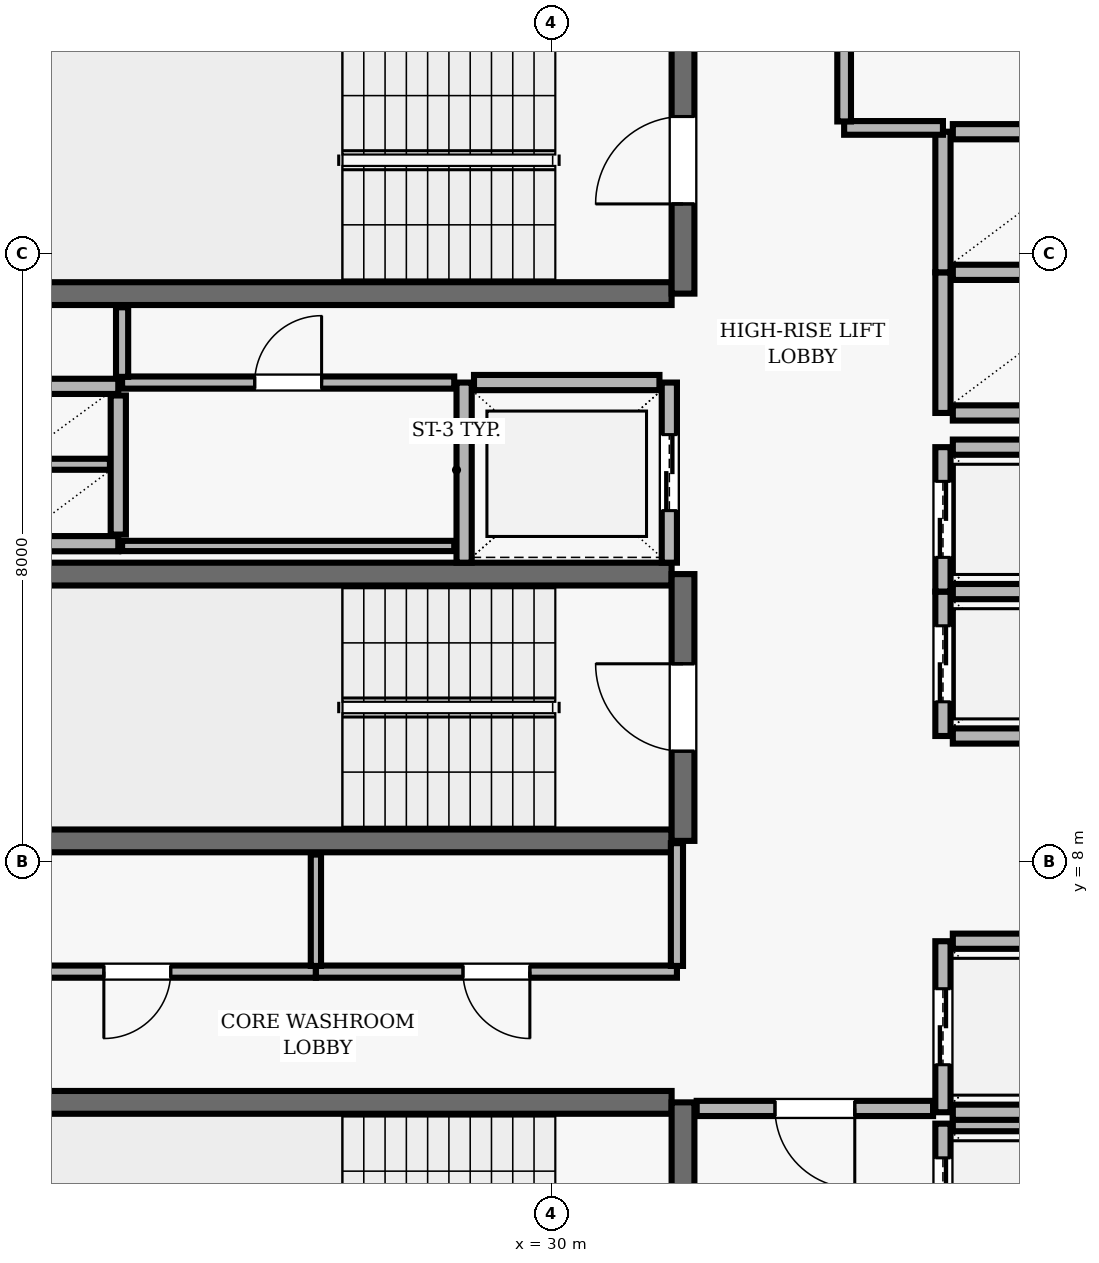
"""IFC4 building model, lengths in metres.
Left out: names, types, materials, properties, quantities, classifications, styles, units other than length and angle.
Written with IfcOpenShell. Run it as: python <this file> out.ifc"""

import sys

from ifc_helpers import new_model, si_unit, direction, frame, frame_2d, origin, place, context, subcontext, project, spatial, rectangle, extrude, element, fill, save


model = new_model("IFC4")
c1 = context("Model", 3, precision=1e-05, world=origin(), true_north=direction((0.0, 1.0)))
c2 = subcontext(c1, "Body", "Model", "MODEL_VIEW")
j1 = project(units=[si_unit("LENGTHUNIT", "METRE"), si_unit("PLANEANGLEUNIT", "RADIAN")], contexts=[c1])
p1 = place(None, origin())
s1 = spatial("IfcSite", under=j1, at=p1, CompositionType="ELEMENT")
p2 = place(p1, origin())
s2 = spatial("IfcBuilding", under=s1, at=p2, CompositionType="ELEMENT")
p3 = place(p2, frame((0.0, 0.0, 203.1)))
s3 = spatial("IfcBuildingStorey", under=s2, at=p3, CompositionType="ELEMENT", Elevation=203.1)
p4 = place(p3, frame((31.58, 4.83, 0.0), z_axis=(0.0, 0.0, 1.0), x_axis=(-1.0, 0.0, 0.0)))
e1 = element("IfcWall", 1, at=p4, inside=s3, PredefinedType="SHEAR", context=c2, shape_type="SweptSolid", body=[
    extrude(rectangle(XDim=8.36, YDim=0.3, at=frame_2d((4.18, 0.0))), origin(), (0.0, 0.0, 1.0), 3.69),
])
p5 = place(p3, frame((31.73, 0.96, 0.0), z_axis=(0.0, 0.0, 1.0), x_axis=(0.0, 1.0, 0.0)))
e2 = element("IfcWall", 2, at=p5, inside=s3, PredefinedType="SHEAR", context=c2, shape_type="SweptSolid", body=[
    extrude(rectangle(XDim=3.87, YDim=0.3, at=frame_2d((1.935, 0.0))), origin(), (0.0, 0.0, 1.0), 3.69),
])
p6 = place(p5, frame((1.54, 0.0, 0.0)))
e3 = element("IfcOpeningElement", 3, at=p6, cuts=e2, PredefinedType="OPENING", context=c2, shape_type="SweptSolid", body=[
    extrude(rectangle(XDim=1.15, YDim=2.15, at=frame_2d((0.575, 1.075))), frame((0.0, 0.16, 0.0), z_axis=(0.0, -1.0, 0.0), x_axis=(1.0, 0.0, 0.0)), (0.0, 0.0, 1.0), 0.32),
])
p7 = place(p3, frame((23.22, 15.47, 0.0), z_axis=(0.0, 0.0, 1.0), x_axis=(1.0, 0.0, 0.0)))
e4 = element("IfcWall", 4, at=p7, inside=s3, PredefinedType="SHEAR", context=c2, shape_type="SweptSolid", body=[
    extrude(rectangle(XDim=8.36, YDim=0.3, at=frame_2d((4.18, 0.0))), origin(), (0.0, 0.0, 1.0), 3.69),
])
p8 = place(p3, frame((31.73, 15.47, 0.0), z_axis=(0.0, 0.0, 1.0), x_axis=(0.0, 1.0, 0.0)))
e5 = element("IfcWall", 5, at=p8, inside=s3, PredefinedType="SHEAR", context=c2, shape_type="SweptSolid", body=[
    extrude(rectangle(XDim=3.51, YDim=0.3, at=frame_2d((1.755, 0.0))), origin(), (0.0, 0.0, 1.0), 3.69),
])
p9 = place(p8, frame((1.18, 0.0, 0.0)))
e6 = element("IfcOpeningElement", 6, at=p9, cuts=e5, PredefinedType="OPENING", context=c2, shape_type="SweptSolid", body=[
    extrude(rectangle(XDim=1.15, YDim=2.15, at=frame_2d((0.575, 1.075))), frame((0.0, 0.16, 0.0), z_axis=(0.0, -1.0, 0.0), x_axis=(1.0, 0.0, 0.0)), (0.0, 0.0, 1.0), 0.32),
])
for number, where, z_axis, x_axis in (
    (7, (31.58, 11.78, 0.0), (0.0, 0.0, 1.0), (-1.0, 0.0, 0.0)),
    (8, (23.22, 8.27, 0.0), (0.0, 0.0, 1.0), (1.0, 0.0, 0.0)),
):
    element("IfcWall", number, at=place(p3, frame(where, z_axis=z_axis, x_axis=x_axis)), inside=s3, PredefinedType="SHEAR", context=c2, shape_type="SweptSolid", body=[
        extrude(rectangle(XDim=8.36, YDim=0.3, at=frame_2d((4.18, 0.0))), origin(), (0.0, 0.0, 1.0), 3.69),
    ])
p10 = place(p3, frame((31.73, 8.27, 0.0), z_axis=(0.0, 0.0, 1.0), x_axis=(0.0, 1.0, 0.0)))
e9 = element("IfcWall", 9, at=p10, inside=s3, PredefinedType="SHEAR", context=c2, shape_type="SweptSolid", body=[
    extrude(rectangle(XDim=3.51, YDim=0.3, at=frame_2d((1.755, 0.0))), origin(), (0.0, 0.0, 1.0), 3.69),
])
p11 = place(p10, frame((1.18, 0.0, 0.0)))
e10 = element("IfcOpeningElement", 10, at=p11, cuts=e9, PredefinedType="OPENING", context=c2, shape_type="SweptSolid", body=[
    extrude(rectangle(XDim=1.15, YDim=2.15, at=frame_2d((0.575, 1.075))), frame((0.0, 0.16, 0.0), z_axis=(0.0, -1.0, 0.0), x_axis=(1.0, 0.0, 0.0)), (0.0, 0.0, 1.0), 0.32),
])
p12 = place(p3, frame((35.15, 4.55, 0.0), z_axis=(0.0, 0.0, 1.0), x_axis=(0.0, -1.0, 0.0)))
e11 = element("IfcWall", 11, at=p12, inside=s3, PredefinedType="SOLIDWALL", context=c2, shape_type="SweptSolid", body=[
    extrude(rectangle(XDim=2.1, YDim=0.2, at=frame_2d((1.05, 0.0))), origin(), (0.0, 0.0, 1.0), 3.69),
])
p13 = place(p12, frame((0.45, 0.0, 0.0)))
e12 = element("IfcOpeningElement", 12, at=p13, cuts=e11, PredefinedType="OPENING", context=c2, shape_type="SweptSolid", body=[
    extrude(rectangle(XDim=1.2, YDim=2.15, at=frame_2d((0.6, 1.075))), frame((0.0, 0.11, 0.0), z_axis=(0.0, -1.0, 0.0), x_axis=(1.0, 0.0, 0.0)), (0.0, 0.0, 1.0), 0.22),
])
p14 = place(p3, frame((37.42, 4.55, 0.0), z_axis=(0.0, 0.0, 1.0), x_axis=(-1.0, 0.0, 0.0)))
e13 = element("IfcWall", 13, at=p14, inside=s3, PredefinedType="SOLIDWALL", context=c2, shape_type="SweptSolid", body=[
    extrude(rectangle(XDim=2.14, YDim=0.2, at=frame_2d((1.07, 0.0))), origin(), (0.0, 0.0, 1.0), 3.69),
])
p15 = place(p3, frame((35.15, 6.95, 0.0), z_axis=(0.0, 0.0, 1.0), x_axis=(0.0, -1.0, 0.0)))
e14 = element("IfcWall", 14, at=p15, inside=s3, PredefinedType="SOLIDWALL", context=c2, shape_type="SweptSolid", body=[
    extrude(rectangle(XDim=2.25, YDim=0.2, at=frame_2d((1.125, 0.0))), origin(), (0.0, 0.0, 1.0), 3.69),
])
p16 = place(p15, frame((0.625, 0.0, 0.0)))
e15 = element("IfcOpeningElement", 15, at=p16, cuts=e14, PredefinedType="OPENING", context=c2, shape_type="SweptSolid", body=[
    extrude(rectangle(XDim=1.0, YDim=2.1, at=frame_2d((0.5, 1.05))), frame((0.0, 0.11, 0.0), z_axis=(0.0, -1.0, 0.0), x_axis=(1.0, 0.0, 0.0)), (0.0, 0.0, 1.0), 0.22),
])
for number, where, z_axis, x_axis in (
    (16, (35.28, 4.7, 0.0), (0.0, 0.0, 1.0), (1.0, 0.0, 0.0)),
    (17, (37.42, 6.95, 0.0), (0.0, 0.0, 1.0), (-1.0, 0.0, 0.0)),
):
    element("IfcWall", number, at=place(p3, frame(where, z_axis=z_axis, x_axis=x_axis)), inside=s3, PredefinedType="SOLIDWALL", context=c2, shape_type="SweptSolid", body=[
        extrude(rectangle(XDim=2.14, YDim=0.2, at=frame_2d((1.07, 0.0))), origin(), (0.0, 0.0, 1.0), 3.69),
    ])
p17 = place(p3, frame((35.15, 11.55, 0.0), z_axis=(0.0, 0.0, 1.0), x_axis=(0.0, -1.0, 0.0)))
e18 = element("IfcWall", 18, at=p17, inside=s3, PredefinedType="SOLIDWALL", context=c2, shape_type="SweptSolid", body=[
    extrude(rectangle(XDim=1.9, YDim=0.2, at=frame_2d((0.95, 0.0))), origin(), (0.0, 0.0, 1.0), 3.69),
])
p18 = place(p17, frame((0.45, 0.0, 0.0)))
e19 = element("IfcOpeningElement", 19, at=p18, cuts=e18, PredefinedType="OPENING", context=c2, shape_type="SweptSolid", body=[
    extrude(rectangle(XDim=1.0, YDim=2.1, at=frame_2d((0.5, 1.05))), frame((0.0, 0.11, 0.0), z_axis=(0.0, -1.0, 0.0), x_axis=(1.0, 0.0, 0.0)), (0.0, 0.0, 1.0), 0.22),
])
for number, where, z_axis, x_axis in (
    (20, (35.28, 9.65, 0.0), (0.0, 0.0, 1.0), (1.0, 0.0, 0.0)),
    (21, (37.42, 11.55, 0.0), (0.0, 0.0, 1.0), (-1.0, 0.0, 0.0)),
):
    element("IfcWall", number, at=place(p3, frame(where, z_axis=z_axis, x_axis=x_axis)), inside=s3, PredefinedType="SOLIDWALL", context=c2, shape_type="SweptSolid", body=[
        extrude(rectangle(XDim=2.14, YDim=0.2, at=frame_2d((1.07, 0.0))), origin(), (0.0, 0.0, 1.0), 3.69),
    ])
p19 = place(p3, frame((35.15, 13.45, 0.0), z_axis=(0.0, 0.0, 1.0), x_axis=(0.0, -1.0, 0.0)))
e22 = element("IfcWall", 22, at=p19, inside=s3, PredefinedType="SOLIDWALL", context=c2, shape_type="SweptSolid", body=[
    extrude(rectangle(XDim=1.9, YDim=0.2, at=frame_2d((0.95, 0.0))), origin(), (0.0, 0.0, 1.0), 3.69),
])
p20 = place(p19, frame((0.45, 0.0, 0.0)))
e23 = element("IfcOpeningElement", 23, at=p20, cuts=e22, PredefinedType="OPENING", context=c2, shape_type="SweptSolid", body=[
    extrude(rectangle(XDim=1.0, YDim=2.1, at=frame_2d((0.5, 1.05))), frame((0.0, 0.11, 0.0), z_axis=(0.0, -1.0, 0.0), x_axis=(1.0, 0.0, 0.0)), (0.0, 0.0, 1.0), 0.22),
])
p21 = place(p3, frame((37.42, 13.45, 0.0), z_axis=(0.0, 0.0, 1.0), x_axis=(-1.0, 0.0, 0.0)))
e24 = element("IfcWall", 24, at=p21, inside=s3, PredefinedType="SOLIDWALL", context=c2, shape_type="SweptSolid", body=[
    extrude(rectangle(XDim=2.14, YDim=0.2, at=frame_2d((1.07, 0.0))), origin(), (0.0, 0.0, 1.0), 3.69),
])
p22 = place(p3, frame((28.85, 14.3, 0.0), z_axis=(0.0, 0.0, 1.0), x_axis=(0.0, -1.0, 0.0)))
e25 = element("IfcWall", 25, at=p22, inside=s3, PredefinedType="SOLIDWALL", context=c2, shape_type="SweptSolid", body=[
    extrude(rectangle(XDim=2.37, YDim=0.2, at=frame_2d((1.185, 0.0))), origin(), (0.0, 0.0, 1.0), 3.69),
])
p23 = place(p3, frame((31.55, 11.93, 0.0), z_axis=(0.0, 0.0, 1.0), x_axis=(0.0, 1.0, 0.0)))
e26 = element("IfcWall", 26, at=p23, inside=s3, PredefinedType="SOLIDWALL", context=c2, shape_type="SweptSolid", body=[
    extrude(rectangle(XDim=2.37, YDim=0.2, at=frame_2d((1.185, 0.0))), origin(), (0.0, 0.0, 1.0), 3.69),
])
p24 = place(p23, frame((0.685, 0.0, 0.0)))
e27 = element("IfcOpeningElement", 27, at=p24, cuts=e26, PredefinedType="OPENING", context=c2, shape_type="SweptSolid", body=[
    extrude(rectangle(XDim=1.0, YDim=2.1, at=frame_2d((0.5, 1.05))), frame((0.0, 0.11, 0.0), z_axis=(0.0, -1.0, 0.0), x_axis=(1.0, 0.0, 0.0)), (0.0, 0.0, 1.0), 0.22),
])
p25 = place(p3, frame((31.42, 14.3, 0.0), z_axis=(0.0, 0.0, 1.0), x_axis=(-1.0, 0.0, 0.0)))
e28 = element("IfcWall", 28, at=p25, inside=s3, PredefinedType="SOLIDWALL", context=c2, shape_type="SweptSolid", body=[
    extrude(rectangle(XDim=2.44, YDim=0.2, at=frame_2d((1.22, 0.0))), origin(), (0.0, 0.0, 1.0), 3.69),
])
p26 = place(p3, frame((35.15, 15.75, 0.0), z_axis=(0.0, 0.0, 1.0), x_axis=(0.0, -1.0, 0.0)))
e29 = element("IfcWall", 29, at=p26, inside=s3, PredefinedType="SOLIDWALL", context=c2, shape_type="SweptSolid", body=[
    extrude(rectangle(XDim=1.85, YDim=0.2, at=frame_2d((0.925, 0.0))), origin(), (0.0, 0.0, 1.0), 3.69),
])
for number, where, z_axis, x_axis in (
    (30, (35.28, 13.9, 0.0), (0.0, 0.0, 1.0), (1.0, 0.0, 0.0)),
    (31, (37.42, 15.75, 0.0), (0.0, 0.0, 1.0), (-1.0, 0.0, 0.0)),
):
    element("IfcWall", number, at=place(p3, frame(where, z_axis=z_axis, x_axis=x_axis)), inside=s3, PredefinedType="SOLIDWALL", context=c2, shape_type="SweptSolid", body=[
        extrude(rectangle(XDim=2.14, YDim=0.2, at=frame_2d((1.07, 0.0))), origin(), (0.0, 0.0, 1.0), 3.69),
    ])
p27 = place(p3, frame((35.15, 17.6, 0.0), z_axis=(0.0, 0.0, 1.0), x_axis=(0.0, -1.0, 0.0)))
e32 = element("IfcWall", 32, at=p27, inside=s3, PredefinedType="SOLIDWALL", context=c2, shape_type="SweptSolid", body=[
    extrude(rectangle(XDim=1.85, YDim=0.2, at=frame_2d((0.925, 0.0))), origin(), (0.0, 0.0, 1.0), 3.69),
])
p28 = place(p3, frame((37.42, 17.6, 0.0), z_axis=(0.0, 0.0, 1.0), x_axis=(-1.0, 0.0, 0.0)))
e33 = element("IfcWall", 33, at=p28, inside=s3, PredefinedType="SOLIDWALL", context=c2, shape_type="SweptSolid", body=[
    extrude(rectangle(XDim=2.14, YDim=0.2, at=frame_2d((1.07, 0.0))), origin(), (0.0, 0.0, 1.0), 3.69),
])
for number, where, z_axis, x_axis in (
    (34, (22.9, 14.25, 0.0), (0.0, 0.0, 1.0), (1.0, 0.0, 0.0)),
    (35, (22.9, 12.18, 0.0), (0.0, 0.0, 1.0), (1.0, 0.0, 0.0)),
):
    element("IfcWall", number, at=place(p3, frame(where, z_axis=z_axis, x_axis=x_axis)), inside=s3, PredefinedType="SOLIDWALL", context=c2, shape_type="SweptSolid", body=[
        extrude(rectangle(XDim=1.4, YDim=0.2, at=frame_2d((0.7, 0.0))), origin(), (0.0, 0.0, 1.0), 3.69),
    ])
p29 = place(p3, frame((24.3, 12.3, 0.0), z_axis=(0.0, 0.0, 1.0), x_axis=(0.0, 1.0, 0.0)))
e36 = element("IfcWall", 36, at=p29, inside=s3, PredefinedType="SOLIDWALL", context=c2, shape_type="SweptSolid", body=[
    extrude(rectangle(XDim=1.83, YDim=0.2, at=frame_2d((0.915, 0.0))), origin(), (0.0, 0.0, 1.0), 3.69),
])
p30 = place(p3, frame((23.01, 13.225, 0.0), z_axis=(0.0, 0.0, 1.0), x_axis=(1.0, 0.0, 0.0)))
e37 = element("IfcWall", 37, at=p30, inside=s3, PredefinedType="PARTITIONING", context=c2, shape_type="SweptSolid", body=[
    extrude(rectangle(XDim=1.18, YDim=0.145, at=frame_2d((0.59, 0.0))), origin(), (0.0, 0.0, 1.0), 3.69),
])
p31 = place(p3, frame((24.35, 12.15, 0.0), z_axis=(0.0, 0.0, 1.0), x_axis=(1.0, 0.0, 0.0)))
e38 = element("IfcWall", 38, at=p31, inside=s3, PredefinedType="PARTITIONING", context=c2, shape_type="SweptSolid", body=[
    extrude(rectangle(XDim=4.37, YDim=0.135, at=frame_2d((2.185, 0.0))), origin(), (0.0, 0.0, 1.0), 3.69),
])
p32 = place(p3, frame((24.35, 14.3, 0.0), z_axis=(0.0, 0.0, 1.0), x_axis=(1.0, 0.0, 0.0)))
e39 = element("IfcWall", 39, at=p32, inside=s3, PredefinedType="PARTITIONING", context=c2, shape_type="SweptSolid", body=[
    extrude(rectangle(XDim=4.37, YDim=0.16, at=frame_2d((2.185, 0.0))), origin(), (0.0, 0.0, 1.0), 3.69),
])
p33 = place(p32, frame((1.745, 0.0, 0.0)))
e40 = element("IfcOpeningElement", 40, at=p33, cuts=e39, PredefinedType="OPENING", context=c2, shape_type="SweptSolid", body=[
    extrude(rectangle(XDim=0.88, YDim=2.1, at=frame_2d((0.44, 1.05))), frame((0.0, 0.09, 0.0), z_axis=(0.0, -1.0, 0.0), x_axis=(1.0, 0.0, 0.0)), (0.0, 0.0, 1.0), 0.18),
])
p34 = place(p3, frame((26.9, 6.55, 0.0), z_axis=(0.0, 0.0, 1.0), x_axis=(-1.0, 0.0, 0.0)))
e41 = element("IfcWall", 41, at=p34, inside=s3, PredefinedType="PARTITIONING", context=c2, shape_type="SweptSolid", body=[
    extrude(rectangle(XDim=4.7, YDim=0.16, at=frame_2d((2.35, 0.0))), origin(), (0.0, 0.0, 1.0), 3.69),
])
p35 = place(p34, frame((1.91, 0.0, 0.0)))
e42 = element("IfcOpeningElement", 42, at=p35, cuts=e41, PredefinedType="OPENING", context=c2, shape_type="SweptSolid", body=[
    extrude(rectangle(XDim=0.88, YDim=2.1, at=frame_2d((0.44, 1.05))), frame((0.0, 0.09, 0.0), z_axis=(0.0, -1.0, 0.0), x_axis=(1.0, 0.0, 0.0)), (0.0, 0.0, 1.0), 0.18),
])
p36 = place(p3, frame((31.65, 6.55, 0.0), z_axis=(0.0, 0.0, 1.0), x_axis=(-1.0, 0.0, 0.0)))
e43 = element("IfcWall", 43, at=p36, inside=s3, PredefinedType="PARTITIONING", context=c2, shape_type="SweptSolid", body=[
    extrude(rectangle(XDim=4.75, YDim=0.16, at=frame_2d((2.375, 0.0))), origin(), (0.0, 0.0, 1.0), 3.69),
])
p37 = place(p36, frame((1.935, 0.0, 0.0)))
e44 = element("IfcOpeningElement", 44, at=p37, cuts=e43, PredefinedType="OPENING", context=c2, shape_type="SweptSolid", body=[
    extrude(rectangle(XDim=0.88, YDim=2.1, at=frame_2d((0.44, 1.05))), frame((0.0, 0.09, 0.0), z_axis=(0.0, -1.0, 0.0), x_axis=(1.0, 0.0, 0.0)), (0.0, 0.0, 1.0), 0.18),
])
p38 = place(p3, frame((33.85, 17.65, 0.0), z_axis=(0.0, 0.0, 1.0), x_axis=(1.0, 0.0, 0.0)))
e45 = element("IfcWall", 45, at=p38, inside=s3, PredefinedType="PARTITIONING", context=c2, shape_type="SweptSolid", body=[
    extrude(rectangle(XDim=1.3, YDim=0.18, at=frame_2d((0.65, 0.0))), origin(), (0.0, 0.0, 1.0), 3.69),
])
p39 = place(p3, frame((35.02, 4.75, 0.0), z_axis=(0.0, 0.0, 1.0), x_axis=(-1.0, 0.0, 0.0)))
e46 = element("IfcWall", 46, at=p39, inside=s3, PredefinedType="SOLIDWALL", context=c2, shape_type="SweptSolid", body=[
    extrude(rectangle(XDim=3.11, YDim=0.2, at=frame_2d((1.555, 0.0))), origin(), (0.0, 0.0, 1.0), 3.69),
])
p40 = place(p39, frame((1.03, 0.0, 0.0)))
e47 = element("IfcOpeningElement", 47, at=p40, cuts=e46, PredefinedType="OPENING", context=c2, shape_type="SweptSolid", body=[
    extrude(rectangle(XDim=1.05, YDim=2.15, at=frame_2d((0.525, 1.075))), frame((0.0, 0.11, 0.0), z_axis=(0.0, -1.0, 0.0), x_axis=(1.0, 0.0, 0.0)), (0.0, 0.0, 1.0), 0.22),
])
p41 = place(p3, frame((24.35, 15.29, 0.0), z_axis=(0.0, 0.0, 1.0), x_axis=(0.0, -1.0, 0.0)))
e48 = element("IfcWall", 48, at=p41, inside=s3, PredefinedType="PARTITIONING", context=c2, shape_type="SweptSolid", body=[
    extrude(rectangle(XDim=0.915, YDim=0.16, at=frame_2d((0.458, 0.0))), origin(), (0.0, 0.0, 1.0), 3.69),
])
p42 = place(p3, frame((26.9, 6.625, 0.0), z_axis=(0.0, 0.0, 1.0), x_axis=(0.0, 1.0, 0.0)))
e49 = element("IfcWall", 49, at=p42, inside=s3, PredefinedType="PARTITIONING", context=c2, shape_type="SweptSolid", body=[
    extrude(rectangle(XDim=1.465, YDim=0.135, at=frame_2d((0.732, 0.0))), origin(), (0.0, 0.0, 1.0), 3.69),
])
p43 = place(p3, frame((31.65, 8.24, 0.0), z_axis=(0.0, 0.0, 1.0), x_axis=(0.0, -1.0, 0.0)))
e50 = element("IfcWall", 50, at=p43, inside=s3, PredefinedType="PARTITIONING", context=c2, shape_type="SweptSolid", body=[
    extrude(rectangle(XDim=1.615, YDim=0.16, at=frame_2d((0.808, 0.0))), origin(), (0.0, 0.0, 1.0), 3.69),
])
p44 = place(p3, frame((33.85, 17.735, 0.0), z_axis=(0.0, 0.0, 1.0), x_axis=(0.0, 1.0, 0.0)))
e51 = element("IfcWall", 51, at=p44, inside=s3, PredefinedType="PARTITIONING", context=c2, shape_type="SweptSolid", body=[
    extrude(rectangle(XDim=2.93, YDim=0.18, at=frame_2d((1.465, 0.0))), origin(), (0.0, 0.0, 1.0), 3.69),
])
p45 = place(p44, frame((0.99, 0.0, 0.0)))
e52 = element("IfcOpeningElement", 52, at=p45, cuts=e51, PredefinedType="OPENING", context=c2, shape_type="SweptSolid", body=[
    extrude(rectangle(XDim=0.95, YDim=2.1, at=frame_2d((0.475, 1.05))), frame((0.0, 0.1, 0.0), z_axis=(0.0, -1.0, 0.0), x_axis=(1.0, 0.0, 0.0)), (0.0, 0.0, 1.0), 0.2),
])
p46 = place(p9, origin())
e53 = element("IfcDoor", 53, at=p46, inside=s3, OperationType="SINGLE_SWING_LEFT", PredefinedType="DOOR", context=c2, shape_type="SweptSolid", body=[
    extrude(rectangle(XDim=1.15, YDim=2.15, at=frame_2d((0.575, 1.075))), frame((0.0, 0.025, 0.0), z_axis=(0.0, -1.0, 0.0), x_axis=(1.0, 0.0, 0.0)), (0.0, 0.0, 1.0), 0.05),
])
fill(e6, e53)
p47 = place(p11, origin())
e54 = element("IfcDoor", 54, at=p47, inside=s3, OperationType="SINGLE_SWING_RIGHT", PredefinedType="DOOR", context=c2, shape_type="SweptSolid", body=[
    extrude(rectangle(XDim=1.15, YDim=2.15, at=frame_2d((0.575, 1.075))), frame((0.0, 0.025, 0.0), z_axis=(0.0, -1.0, 0.0), x_axis=(1.0, 0.0, 0.0)), (0.0, 0.0, 1.0), 0.05),
])
fill(e10, e54)
p48 = place(p13, origin())
e55 = element("IfcDoor", 55, at=p48, inside=s3, OperationType="DOUBLE_DOOR_SLIDING", PredefinedType="DOOR", context=c2, shape_type="SweptSolid", body=[
    extrude(rectangle(XDim=1.2, YDim=2.15, at=frame_2d((0.6, 1.075))), frame((0.0, 0.025, 0.0), z_axis=(0.0, -1.0, 0.0), x_axis=(1.0, 0.0, 0.0)), (0.0, 0.0, 1.0), 0.05),
])
fill(e12, e55)
p49 = place(p16, origin())
e56 = element("IfcDoor", 56, at=p49, inside=s3, OperationType="DOUBLE_DOOR_SLIDING", PredefinedType="DOOR", context=c2, shape_type="SweptSolid", body=[
    extrude(rectangle(XDim=1.0, YDim=2.1, at=frame_2d((0.5, 1.05))), frame((0.0, 0.025, 0.0), z_axis=(0.0, -1.0, 0.0), x_axis=(1.0, 0.0, 0.0)), (0.0, 0.0, 1.0), 0.05),
])
fill(e15, e56)
p50 = place(p18, origin())
e57 = element("IfcDoor", 57, at=p50, inside=s3, OperationType="DOUBLE_DOOR_SLIDING", PredefinedType="DOOR", context=c2, shape_type="SweptSolid", body=[
    extrude(rectangle(XDim=1.0, YDim=2.1, at=frame_2d((0.5, 1.05))), frame((0.0, 0.025, 0.0), z_axis=(0.0, -1.0, 0.0), x_axis=(1.0, 0.0, 0.0)), (0.0, 0.0, 1.0), 0.05),
])
fill(e19, e57)
p51 = place(p20, origin())
e58 = element("IfcDoor", 58, at=p51, inside=s3, OperationType="DOUBLE_DOOR_SLIDING", PredefinedType="DOOR", context=c2, shape_type="SweptSolid", body=[
    extrude(rectangle(XDim=1.0, YDim=2.1, at=frame_2d((0.5, 1.05))), frame((0.0, 0.025, 0.0), z_axis=(0.0, -1.0, 0.0), x_axis=(1.0, 0.0, 0.0)), (0.0, 0.0, 1.0), 0.05),
])
fill(e23, e58)
p52 = place(p24, origin())
e59 = element("IfcDoor", 59, at=p52, inside=s3, OperationType="DOUBLE_DOOR_SLIDING", PredefinedType="DOOR", context=c2, shape_type="SweptSolid", body=[
    extrude(rectangle(XDim=1.0, YDim=2.1, at=frame_2d((0.5, 1.05))), frame((0.0, 0.025, 0.0), z_axis=(0.0, -1.0, 0.0), x_axis=(1.0, 0.0, 0.0)), (0.0, 0.0, 1.0), 0.05),
])
fill(e27, e59)
p53 = place(p40, origin())
e60 = element("IfcDoor", 60, at=p53, inside=s3, OperationType="SINGLE_SWING_LEFT", PredefinedType="DOOR", context=c2, shape_type="SweptSolid", body=[
    extrude(rectangle(XDim=1.05, YDim=2.15, at=frame_2d((0.525, 1.075))), frame((0.0, 0.025, 0.0), z_axis=(0.0, -1.0, 0.0), x_axis=(1.0, 0.0, 0.0)), (0.0, 0.0, 1.0), 0.05),
])
fill(e47, e60)
p54 = place(p35, origin())
e61 = element("IfcDoor", 61, at=p54, inside=s3, OperationType="SINGLE_SWING_RIGHT", PredefinedType="DOOR", context=c2, shape_type="SweptSolid", body=[
    extrude(rectangle(XDim=0.88, YDim=2.1, at=frame_2d((0.44, 1.05))), frame((0.0, 0.025, 0.0), z_axis=(0.0, -1.0, 0.0), x_axis=(1.0, 0.0, 0.0)), (0.0, 0.0, 1.0), 0.05),
])
fill(e42, e61)
p55 = place(p37, origin())
e62 = element("IfcDoor", 62, at=p55, inside=s3, OperationType="SINGLE_SWING_LEFT", PredefinedType="DOOR", context=c2, shape_type="SweptSolid", body=[
    extrude(rectangle(XDim=0.88, YDim=2.1, at=frame_2d((0.44, 1.05))), frame((0.0, 0.025, 0.0), z_axis=(0.0, -1.0, 0.0), x_axis=(1.0, 0.0, 0.0)), (0.0, 0.0, 1.0), 0.05),
])
fill(e44, e62)
p56 = place(p33, origin())
e63 = element("IfcDoor", 63, at=p56, inside=s3, OperationType="SINGLE_SWING_RIGHT", PredefinedType="DOOR", context=c2, shape_type="SweptSolid", body=[
    extrude(rectangle(XDim=0.88, YDim=2.1, at=frame_2d((0.44, 1.05))), frame((0.0, 0.025, 0.0), z_axis=(0.0, -1.0, 0.0), x_axis=(1.0, 0.0, 0.0)), (0.0, 0.0, 1.0), 0.05),
])
fill(e40, e63)
save(model, sys.argv[1])
